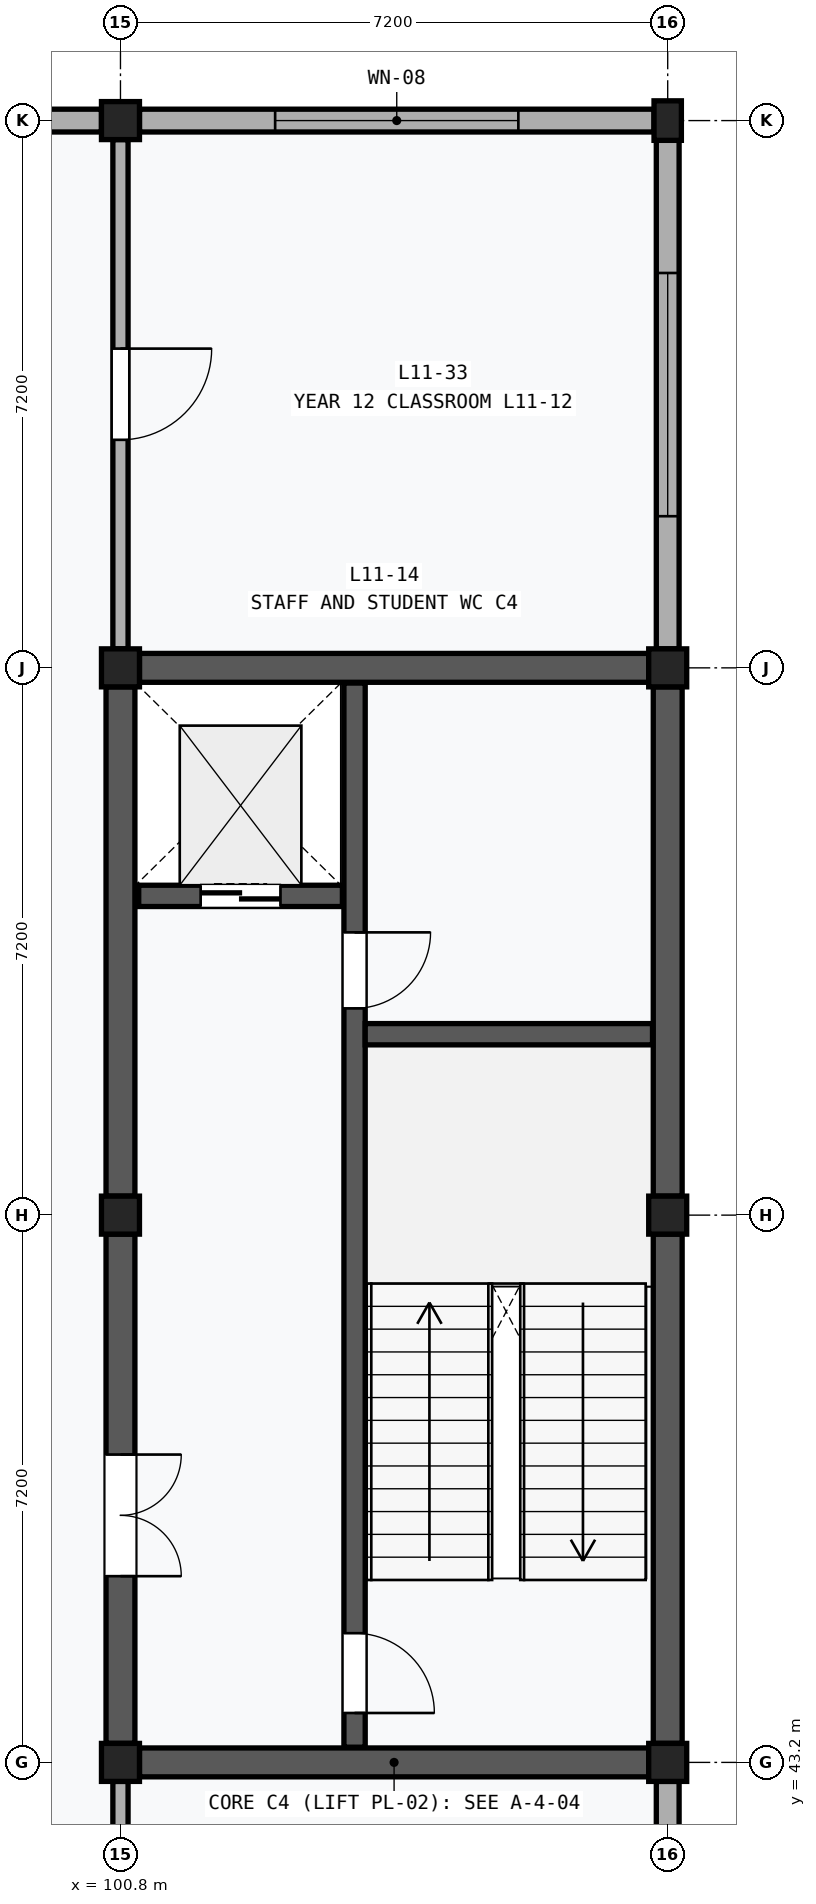
"""IFC4 building model, lengths in metres.
Left out: names, types, materials, properties, quantities, classifications, styles, units other than length and angle.
Written with IfcOpenShell. Run it as: python <this file> out.ifc"""

import sys

from ifc_helpers import new_model, si_unit, direction, frame, frame_2d, origin, origin_2d, place, context, subcontext, project, spatial, rectangle, extrude, element, fill, save


model = new_model("IFC4")
c1 = context("Model", 3, precision=1e-05, world=origin(), true_north=direction((0.0, 1.0)))
c2 = subcontext(c1, "Body", "Model", "MODEL_VIEW")
j1 = project(units=[si_unit("LENGTHUNIT", "METRE"), si_unit("PLANEANGLEUNIT", "RADIAN")], contexts=[c1])
p1 = place(None, origin())
s1 = spatial("IfcSite", under=j1, at=p1, CompositionType="ELEMENT")
p2 = place(p1, origin())
s2 = spatial("IfcBuilding", under=s1, at=p2, CompositionType="ELEMENT")
p3 = place(p2, frame((0.0, 0.0, 46.8)))
s3 = spatial("IfcBuildingStorey", under=s2, at=p3, CompositionType="ELEMENT", Elevation=46.8)
for number, where, z_axis, x_axis in (
    (1, (100.8, 43.2, 0.0), (0.0, 0.0, 1.0), (1.0, 0.0, 0.0)),
    (2, (100.8, 50.4, 0.0), (0.0, 0.0, 1.0), (1.0, 0.0, 0.0)),
    (3, (100.8, 57.6, 0.0), (0.0, 0.0, 1.0), (1.0, 0.0, 0.0)),
    (4, (100.8, 64.8, 0.0), (0.0, 0.0, 1.0), (1.0, 0.0, 0.0)),
    (5, (108.0, 43.2, 0.0), (0.0, 0.0, 1.0), (1.0, 0.0, 0.0)),
    (6, (108.0, 50.4, 0.0), (0.0, 0.0, 1.0), (1.0, 0.0, 0.0)),
    (7, (108.0, 57.6, 0.0), (0.0, 0.0, 1.0), (1.0, 0.0, 0.0)),
):
    element("IfcColumn", number, at=place(p3, frame(where, z_axis=z_axis, x_axis=x_axis)), inside=s3, PredefinedType="COLUMN", context=c2, shape_type="SweptSolid", body=[
        extrude(rectangle(XDim=0.5, YDim=0.5, at=origin_2d()), origin(), (0.0, 0.0, 1.0), 4.2),
    ])
p4 = place(p3, frame((108.0, 64.8, 0.0), z_axis=(0.0, 0.0, 1.0), x_axis=(1.0, 0.0, 0.0)))
e8 = element("IfcColumn", 8, at=p4, inside=s3, PredefinedType="PILASTER", context=c2, shape_type="SweptSolid", body=[
    extrude(rectangle(XDim=0.36, YDim=0.52, at=origin_2d()), origin(), (0.0, 0.0, 1.0), 4.2),
])
p5 = place(p3, frame((93.85, 64.8, 0.0), z_axis=(0.0, 0.0, 1.0), x_axis=(1.0, 0.0, 0.0)))
e9 = element("IfcWall", 9, at=p5, inside=s3, PredefinedType="SOLIDWALL", context=c2, shape_type="SweptSolid", body=[
    extrude(rectangle(XDim=6.7, YDim=0.3, at=frame_2d((3.35, 0.0))), origin(), (0.0, 0.0, 1.0), 3.37),
])
p6 = place(p5, frame((1.85, 0.0, 0.9)))
e10 = element("IfcOpeningElement", 10, at=p6, cuts=e9, PredefinedType="OPENING", context=c2, shape_type="SweptSolid", body=[
    extrude(rectangle(XDim=3.0, YDim=1.8, at=frame_2d((1.5, 0.9))), frame((0.0, 0.162, 0.0), z_axis=(0.0, -1.0, 0.0), x_axis=(1.0, 0.0, 0.0)), (0.0, 0.0, 1.0), 0.324),
])
p7 = place(p3, frame((108.0, 36.26, 0.0), z_axis=(0.0, 0.0, 1.0), x_axis=(0.0, 1.0, 0.0)))
e11 = element("IfcWall", 11, at=p7, inside=s3, PredefinedType="SOLIDWALL", context=c2, shape_type="SweptSolid", body=[
    extrude(rectangle(XDim=6.69, YDim=0.3, at=frame_2d((3.345, 0.0))), origin(), (0.0, 0.0, 1.0), 3.37),
])
p8 = place(p3, frame((101.05, 64.8, 0.0), z_axis=(0.0, 0.0, 1.0), x_axis=(1.0, 0.0, 0.0)))
e12 = element("IfcWall", 12, at=p8, inside=s3, PredefinedType="SOLIDWALL", context=c2, shape_type="SweptSolid", body=[
    extrude(rectangle(XDim=6.77, YDim=0.3, at=frame_2d((3.385, 0.0))), origin(), (0.0, 0.0, 1.0), 3.37),
])
p9 = place(p8, frame((1.785, 0.0, 0.9)))
e13 = element("IfcOpeningElement", 13, at=p9, cuts=e12, PredefinedType="OPENING", context=c2, shape_type="SweptSolid", body=[
    extrude(rectangle(XDim=3.2, YDim=1.8, at=frame_2d((1.6, 0.9))), frame((0.0, 0.162, 0.0), z_axis=(0.0, -1.0, 0.0), x_axis=(1.0, 0.0, 0.0)), (0.0, 0.0, 1.0), 0.324),
])
p10 = place(p3, frame((108.0, 57.85, 0.0), z_axis=(0.0, 0.0, 1.0), x_axis=(0.0, 1.0, 0.0)))
e14 = element("IfcWall", 14, at=p10, inside=s3, PredefinedType="SOLIDWALL", context=c2, shape_type="SweptSolid", body=[
    extrude(rectangle(XDim=6.69, YDim=0.3, at=frame_2d((3.345, 0.0))), origin(), (0.0, 0.0, 1.0), 3.37),
])
p11 = place(p10, frame((1.745, 0.0, 0.9)))
e15 = element("IfcOpeningElement", 15, at=p11, cuts=e14, PredefinedType="OPENING", context=c2, shape_type="SweptSolid", body=[
    extrude(rectangle(XDim=3.2, YDim=1.8, at=frame_2d((1.6, 0.9))), frame((0.0, 0.162, 0.0), z_axis=(0.0, -1.0, 0.0), x_axis=(1.0, 0.0, 0.0)), (0.0, 0.0, 1.0), 0.324),
])
p12 = place(p3, frame((100.8, 43.45, 0.0), z_axis=(0.0, 0.0, 1.0), x_axis=(0.0, 1.0, 0.0)))
e16 = element("IfcWall", 16, at=p12, inside=s3, PredefinedType="SHEAR", context=c2, shape_type="SweptSolid", body=[
    extrude(rectangle(XDim=6.7, YDim=0.38, at=frame_2d((3.35, 0.0))), origin(), (0.0, 0.0, 1.0), 3.29),
])
p13 = place(p12, frame((2.2, 0.0, 0.0)))
e17 = element("IfcOpeningElement", 17, at=p13, cuts=e16, PredefinedType="OPENING", context=c2, shape_type="SweptSolid", body=[
    extrude(rectangle(XDim=1.6, YDim=2.2, at=frame_2d((0.8, 1.1))), frame((0.0, 0.202, 0.0), z_axis=(0.0, -1.0, 0.0), x_axis=(1.0, 0.0, 0.0)), (0.0, 0.0, 1.0), 0.404),
])
p14 = place(p3, frame((100.8, 50.65, 0.0), z_axis=(0.0, 0.0, 1.0), x_axis=(0.0, 1.0, 0.0)))
e18 = element("IfcWall", 18, at=p14, inside=s3, PredefinedType="SHEAR", context=c2, shape_type="SweptSolid", body=[
    extrude(rectangle(XDim=6.7, YDim=0.38, at=frame_2d((3.35, 0.0))), origin(), (0.0, 0.0, 1.0), 3.29),
])
p15 = place(p3, frame((108.0, 43.45, 0.0), z_axis=(0.0, 0.0, 1.0), x_axis=(0.0, 1.0, 0.0)))
e19 = element("IfcWall", 19, at=p15, inside=s3, PredefinedType="SHEAR", context=c2, shape_type="SweptSolid", body=[
    extrude(rectangle(XDim=6.7, YDim=0.38, at=frame_2d((3.35, 0.0))), origin(), (0.0, 0.0, 1.0), 3.37),
])
p16 = place(p3, frame((108.0, 50.65, 0.0), z_axis=(0.0, 0.0, 1.0), x_axis=(0.0, 1.0, 0.0)))
e20 = element("IfcWall", 20, at=p16, inside=s3, PredefinedType="SHEAR", context=c2, shape_type="SweptSolid", body=[
    extrude(rectangle(XDim=6.7, YDim=0.38, at=frame_2d((3.35, 0.0))), origin(), (0.0, 0.0, 1.0), 3.37),
])
for number, where, z_axis, x_axis in (
    (21, (101.05, 43.2, 0.0), (0.0, 0.0, 1.0), (1.0, 0.0, 0.0)),
    (22, (101.05, 57.6, 0.0), (0.0, 0.0, 1.0), (1.0, 0.0, 0.0)),
):
    element("IfcWall", number, at=place(p3, frame(where, z_axis=z_axis, x_axis=x_axis)), inside=s3, PredefinedType="SHEAR", context=c2, shape_type="SweptSolid", body=[
        extrude(rectangle(XDim=6.7, YDim=0.38, at=frame_2d((3.35, 0.0))), origin(), (0.0, 0.0, 1.0), 3.29),
    ])
p17 = place(p3, frame((103.88, 43.4, 0.0), z_axis=(0.0, 0.0, 1.0), x_axis=(0.0, 1.0, 0.0)))
e23 = element("IfcWall", 23, at=p17, inside=s3, PredefinedType="SHEAR", context=c2, shape_type="SweptSolid", body=[
    extrude(rectangle(XDim=14.0, YDim=0.28, at=frame_2d((7.0, 0.0))), origin(), (0.0, 0.0, 1.0), 3.97),
])
p18 = place(p17, frame((0.45, 0.0, 0.0)))
e24 = element("IfcOpeningElement", 24, at=p18, cuts=e23, PredefinedType="OPENING", context=c2, shape_type="SweptSolid", body=[
    extrude(rectangle(XDim=1.05, YDim=2.15, at=frame_2d((0.525, 1.075))), frame((0.0, 0.152, 0.0), z_axis=(0.0, -1.0, 0.0), x_axis=(1.0, 0.0, 0.0)), (0.0, 0.0, 1.0), 0.304),
])
p19 = place(p17, frame((9.72, 0.0, 0.0)))
e25 = element("IfcOpeningElement", 25, at=p19, cuts=e23, PredefinedType="OPENING", context=c2, shape_type="SweptSolid", body=[
    extrude(rectangle(XDim=1.0, YDim=2.15, at=frame_2d((0.5, 1.075))), frame((0.0, 0.152, 0.0), z_axis=(0.0, -1.0, 0.0), x_axis=(1.0, 0.0, 0.0)), (0.0, 0.0, 1.0), 0.304),
])
p20 = place(p3, frame((104.02, 52.78, 0.0), z_axis=(0.0, 0.0, 1.0), x_axis=(1.0, 0.0, 0.0)))
e26 = element("IfcWall", 26, at=p20, inside=s3, PredefinedType="SHEAR", context=c2, shape_type="SweptSolid", body=[
    extrude(rectangle(XDim=3.78, YDim=0.28, at=frame_2d((1.89, 0.0))), origin(), (0.0, 0.0, 1.0), 3.97),
])
p21 = place(p3, frame((101.04, 54.6, 0.0), z_axis=(0.0, 0.0, 1.0), x_axis=(1.0, 0.0, 0.0)))
e27 = element("IfcWall", 27, at=p21, inside=s3, PredefinedType="SHEAR", context=c2, shape_type="SweptSolid", body=[
    extrude(rectangle(XDim=2.68, YDim=0.28, at=frame_2d((1.34, 0.0))), origin(), (0.0, 0.0, 1.0), 3.97),
])
p22 = place(p21, frame((0.815, 0.0, 0.0)))
e28 = element("IfcOpeningElement", 28, at=p22, cuts=e27, PredefinedType="OPENING", context=c2, shape_type="SweptSolid", body=[
    extrude(rectangle(XDim=1.05, YDim=2.2, at=frame_2d((0.525, 1.1))), frame((0.0, 0.152, 0.0), z_axis=(0.0, -1.0, 0.0), x_axis=(1.0, 0.0, 0.0)), (0.0, 0.0, 1.0), 0.304),
])
p23 = place(p3, frame((100.8, 36.25, 0.0), z_axis=(0.0, 0.0, 1.0), x_axis=(0.0, 1.0, 0.0)))
e29 = element("IfcWall", 29, at=p23, inside=s3, PredefinedType="PARTITIONING", context=c2, shape_type="SweptSolid", body=[
    extrude(rectangle(XDim=6.7, YDim=0.2, at=frame_2d((3.35, 0.0))), origin(), (0.0, 0.0, 1.0), 3.29),
])
p24 = place(p23, frame((2.77, 0.0, 0.0)))
e30 = element("IfcOpeningElement", 30, at=p24, cuts=e29, PredefinedType="OPENING", context=c2, shape_type="SweptSolid", body=[
    extrude(rectangle(XDim=1.16, YDim=2.22, at=frame_2d((0.58, 1.11))), frame((0.0, 0.112, 0.0), z_axis=(0.0, -1.0, 0.0), x_axis=(1.0, 0.0, 0.0)), (0.0, 0.0, 1.0), 0.224),
])
p25 = place(p3, frame((100.8, 57.85, 0.0), z_axis=(0.0, 0.0, 1.0), x_axis=(0.0, 1.0, 0.0)))
e31 = element("IfcWall", 31, at=p25, inside=s3, PredefinedType="PARTITIONING", context=c2, shape_type="SweptSolid", body=[
    extrude(rectangle(XDim=6.7, YDim=0.2, at=frame_2d((3.35, 0.0))), origin(), (0.0, 0.0, 1.0), 3.29),
])
p26 = place(p25, frame((2.75, 0.0, 0.0)))
e32 = element("IfcOpeningElement", 32, at=p26, cuts=e31, PredefinedType="OPENING", context=c2, shape_type="SweptSolid", body=[
    extrude(rectangle(XDim=1.2, YDim=2.24, at=frame_2d((0.6, 1.12))), frame((0.0, 0.112, 0.0), z_axis=(0.0, -1.0, 0.0), x_axis=(1.0, 0.0, 0.0)), (0.0, 0.0, 1.0), 0.224),
])
p27 = place(p9, origin())
e33 = element("IfcWindow", 33, at=p27, inside=s3, PartitioningType="SINGLE_PANEL", PredefinedType="WINDOW", context=c2, shape_type="SweptSolid", body=[
    extrude(rectangle(XDim=3.2, YDim=1.8, at=frame_2d((1.6, 0.9))), frame((0.0, 0.03, 0.0), z_axis=(0.0, -1.0, 0.0), x_axis=(1.0, 0.0, 0.0)), (0.0, 0.0, 1.0), 0.06),
])
fill(e13, e33)
p28 = place(p11, origin())
e34 = element("IfcWindow", 34, at=p28, inside=s3, PartitioningType="SINGLE_PANEL", PredefinedType="WINDOW", context=c2, shape_type="SweptSolid", body=[
    extrude(rectangle(XDim=3.2, YDim=1.8, at=frame_2d((1.6, 0.9))), frame((0.0, 0.03, 0.0), z_axis=(0.0, -1.0, 0.0), x_axis=(1.0, 0.0, 0.0)), (0.0, 0.0, 1.0), 0.06),
])
fill(e15, e34)
p29 = place(p13, frame((1.6, 0.0, 0.0), z_axis=(0.0, 0.0, 1.0), x_axis=(-1.0, 0.0, 0.0)))
e35 = element("IfcDoor", 35, at=p29, inside=s3, OperationType="DOUBLE_DOOR_SINGLE_SWING", PredefinedType="DOOR", context=c2, shape_type="SweptSolid", body=[
    extrude(rectangle(XDim=1.6, YDim=2.2, at=frame_2d((0.8, 1.1))), frame((0.0, 0.025, 0.0), z_axis=(0.0, -1.0, 0.0), x_axis=(1.0, 0.0, 0.0)), (0.0, 0.0, 1.0), 0.05),
])
fill(e17, e35)
p30 = place(p18, frame((1.05, 0.0, 0.0), z_axis=(0.0, 0.0, 1.0), x_axis=(-1.0, 0.0, 0.0)))
e36 = element("IfcDoor", 36, at=p30, inside=s3, OperationType="SINGLE_SWING_RIGHT", PredefinedType="DOOR", context=c2, shape_type="SweptSolid", body=[
    extrude(rectangle(XDim=1.05, YDim=2.15, at=frame_2d((0.525, 1.075))), frame((0.0, 0.025, 0.0), z_axis=(0.0, -1.0, 0.0), x_axis=(1.0, 0.0, 0.0)), (0.0, 0.0, 1.0), 0.05),
])
fill(e24, e36)
p31 = place(p19, frame((1.0, 0.0, 0.0), z_axis=(0.0, 0.0, 1.0), x_axis=(-1.0, 0.0, 0.0)))
e37 = element("IfcDoor", 37, at=p31, inside=s3, OperationType="SINGLE_SWING_LEFT", PredefinedType="DOOR", context=c2, shape_type="SweptSolid", body=[
    extrude(rectangle(XDim=1.0, YDim=2.15, at=frame_2d((0.5, 1.075))), frame((0.0, 0.025, 0.0), z_axis=(0.0, -1.0, 0.0), x_axis=(1.0, 0.0, 0.0)), (0.0, 0.0, 1.0), 0.05),
])
fill(e25, e37)
p32 = place(p22, frame((1.05, 0.0, 0.0), z_axis=(0.0, 0.0, 1.0), x_axis=(-1.0, 0.0, 0.0)))
e38 = element("IfcDoor", 38, at=p32, inside=s3, OperationType="DOUBLE_DOOR_SLIDING", PredefinedType="DOOR", context=c2, shape_type="SweptSolid", body=[
    extrude(rectangle(XDim=1.05, YDim=2.2, at=frame_2d((0.525, 1.1))), frame((0.0, 0.025, 0.0), z_axis=(0.0, -1.0, 0.0), x_axis=(1.0, 0.0, 0.0)), (0.0, 0.0, 1.0), 0.05),
])
fill(e28, e38)
p33 = place(p26, frame((1.2, 0.0, 0.0), z_axis=(0.0, 0.0, 1.0), x_axis=(-1.0, 0.0, 0.0)))
e39 = element("IfcDoor", 39, at=p33, inside=s3, OperationType="SINGLE_SWING_LEFT", PredefinedType="DOOR", context=c2, shape_type="SweptSolid", body=[
    extrude(rectangle(XDim=1.2, YDim=2.24, at=frame_2d((0.6, 1.12))), frame((0.0, 0.025, 0.0), z_axis=(0.0, -1.0, 0.0), x_axis=(1.0, 0.0, 0.0)), (0.0, 0.0, 1.0), 0.05),
])
fill(e32, e39)
save(model, sys.argv[1])
